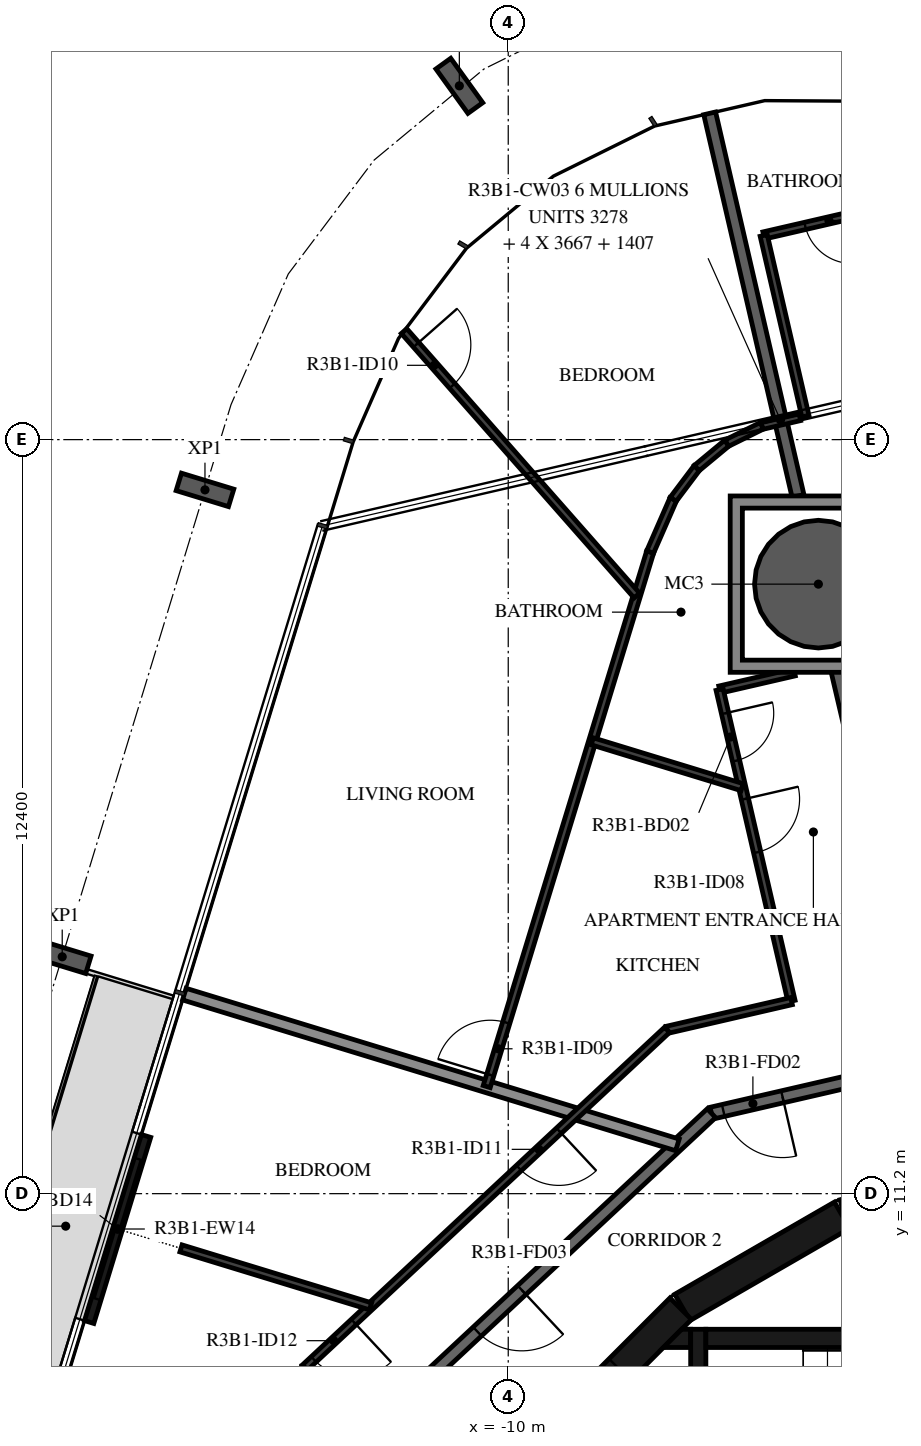
"""IFC4 building model, lengths in metres.
Left out: names, types, materials, properties, quantities, classifications, styles, units other than length and angle.
Written with IfcOpenShell. Run it as: python <this file> out.ifc"""

import sys

from ifc_helpers import new_model, si_unit, direction, frame, frame_2d, origin, origin_2d, place, context, subcontext, project, spatial, polyline, rectangle, hollow_circle, i_section, outline, extrude, element, fill, save


model = new_model("IFC4")
c1 = context("Model", 3, precision=1e-05, world=origin(), true_north=direction((0.0, 1.0)))
c2 = subcontext(c1, "Body", "Model", "MODEL_VIEW")
j1 = project(units=[si_unit("LENGTHUNIT", "METRE"), si_unit("PLANEANGLEUNIT", "RADIAN")], contexts=[c1])
p1 = place(None, origin())
s1 = spatial("IfcSite", under=j1, at=p1, CompositionType="ELEMENT")
p2 = place(p1, origin())
s2 = spatial("IfcBuilding", under=s1, at=p2, CompositionType="ELEMENT")
p3 = place(p2, frame((0.0, 0.0, 123.9)))
s3 = spatial("IfcBuildingStorey", under=s2, at=p3, CompositionType="ELEMENT", Elevation=123.9)
p4 = place(p3, frame((-4.9, 21.223, -0.38), z_axis=(0.0, 0.0, 1.0), x_axis=(1.0, 0.0, 0.0)))
e1 = element("IfcColumn", 1, at=p4, inside=s3, PredefinedType="COLUMN", context=c2, shape_type="SweptSolid", body=[
    extrude(hollow_circle(Radius=1.05, WallThickness=0.05, at=origin_2d()), origin(), (0.0, 0.0, 1.0), 3.5),
])
for number, where, z_axis, x_axis in (
    (2, (-10.804, 29.418, -0.38), (0.0, 0.0, 1.0), (0.811, 0.585, 0.0)),
    (3, (-14.987, 22.773, -0.38), (0.0, 0.0, 1.0), (0.292, 0.956, 0.0)),
    (4, (-17.335, 15.095, -0.38), (0.0, 0.0, 1.0), (0.292, 0.956, 0.0)),
):
    element("IfcColumn", number, at=place(p3, frame(where, z_axis=z_axis, x_axis=x_axis)), inside=s3, PredefinedType="COLUMN", context=c2, shape_type="SweptSolid", body=[
        extrude(i_section(OverallWidth=0.3, OverallDepth=0.9, WebThickness=0.019, FlangeThickness=0.035, FilletRadius=0.03, at=origin_2d()), origin(), (0.0, 0.0, 1.0), 3.5),
    ])
p5 = place(p3, frame((-15.956, 12.149, 0.0), z_axis=(0.0, 0.0, 1.0), x_axis=(-0.29243949851, -0.956284026695, 0.0)))
e5 = element("IfcWall", 5, at=p5, inside=s3, PredefinedType="STANDARD", context=c2, shape_type="SweptSolid", body=[
    extrude(rectangle(XDim=3.2, YDim=0.16, at=frame_2d((1.6, 0.0))), origin(), (0.0, 0.0, 1.0), 3.12),
])
p6 = place(p5, frame((0.4, 0.0, 0.0)))
e6 = element("IfcOpeningElement", 6, at=p6, cuts=e5, PredefinedType="OPENING", context=c2, shape_type="SweptSolid", body=[
    extrude(rectangle(XDim=2.4, YDim=2.4, at=frame_2d((1.2, 1.2))), frame((0.0, 0.09, 0.0), z_axis=(0.0, -1.0, 0.0), x_axis=(1.0, 0.0, 0.0)), (0.0, 0.0, 1.0), 0.18),
])
for number, where, z_axis, x_axis in (
    (7, (-1.55, 11.643, 0.0), (0.0, 0.0, 1.0), (-0.966, -0.259, 0.0)),
    (8, (-4.51, 10.845, 0.0), (0.0, 0.0, 1.0), (-0.866, -0.5, 0.0)),
):
    element("IfcWall", number, at=place(p3, frame(where, z_axis=z_axis, x_axis=x_axis)), inside=s3, PredefinedType="SHEAR", context=c2, shape_type="SweptSolid", body=[
        extrude(rectangle(XDim=3.033, YDim=0.5, at=frame_2d((1.516, 0.0))), origin(), (0.0, 0.0, 1.0), 3.12),
    ])
p7 = place(p3, frame((-7.164, 9.308, 0.0), z_axis=(0.0, 0.0, 1.0), x_axis=(-0.707106781187, -0.707106781187, 0.0)))
e9 = element("IfcWall", 9, at=p7, inside=s3, PredefinedType="SHEAR", context=c2, shape_type="SweptSolid", body=[
    extrude(rectangle(XDim=3.032, YDim=0.5, at=frame_2d((1.516, 0.0))), origin(), (0.0, 0.0, 1.0), 3.12),
])
p8 = place(p7, frame((1.416, 0.0, 0.0)))
e10 = element("IfcOpeningElement", 10, at=p8, cuts=e9, PredefinedType="OPENING", context=c2, shape_type="SweptSolid", body=[
    extrude(rectangle(XDim=1.2, YDim=2.1, at=frame_2d((0.6, 1.05))), frame((0.0, 0.26, 0.0), z_axis=(0.0, -1.0, 0.0), x_axis=(1.0, 0.0, 0.0)), (0.0, 0.0, 1.0), 0.52),
])
p9 = place(p3, frame((-6.75, 8.82, 0.0), z_axis=(0.0, 0.0, 1.0), x_axis=(1.0, 0.0, 0.0)))
e11 = element("IfcWall", 11, at=p9, inside=s3, PredefinedType="SHEAR", context=c2, shape_type="SweptSolid", body=[
    extrude(rectangle(XDim=6.75, YDim=0.3, at=frame_2d((3.375, 0.0))), origin(), (0.0, 0.0, 1.0), 3.12),
])
p10 = place(p3, frame((-6.875, 8.97, 0.0), z_axis=(0.0, 0.0, 1.0), x_axis=(0.0, -1.0, 0.0)))
e12 = element("IfcWall", 12, at=p10, inside=s3, PredefinedType="SHEAR", context=c2, shape_type="SweptSolid", body=[
    extrude(rectangle(XDim=3.92, YDim=0.25, at=frame_2d((1.96, 0.0))), origin(), (0.0, 0.0, 1.0), 3.12),
])
p11 = place(p10, frame((1.61, 0.0, 0.0)))
e13 = element("IfcOpeningElement", 13, at=p11, cuts=e12, PredefinedType="OPENING", context=c2, shape_type="SweptSolid", body=[
    extrude(rectangle(XDim=1.2, YDim=2.1, at=frame_2d((0.6, 1.05))), frame((0.0, 0.135, 0.0), z_axis=(0.0, -1.0, 0.0), x_axis=(1.0, 0.0, 0.0)), (0.0, 0.0, 1.0), 0.27),
])
p12 = place(p3, origin())
e14 = element("IfcWall", 14, at=p12, inside=s3, PredefinedType="SHEAR", context=c2, shape_type="SweptSolid", body=[
    extrude(outline(polyline([(-7.148, 8.97), (-7.0, 8.97), (-7.0, 8.67), (-7.448, 8.67), (-7.148, 8.97)])), origin(), (0.0, 0.0, 1.0), 3.12),
])
p13 = place(p3, frame((0.495, 14.175, 0.0), z_axis=(0.0, 0.0, 1.0), x_axis=(-0.974376622151, -0.224922649383, 0.0)))
e15 = element("IfcWall", 15, at=p13, inside=s3, PredefinedType="STANDARD", context=c2, shape_type="SweptSolid", body=[
    extrude(rectangle(XDim=7.342, YDim=0.2, at=frame_2d((3.671, 0.0))), origin(), (0.0, 0.0, 1.0), 3.12),
])
p14 = place(p13, frame((6.142, 0.0, 0.0)))
e16 = element("IfcOpeningElement", 16, at=p14, cuts=e15, PredefinedType="OPENING", context=c2, shape_type="SweptSolid", body=[
    extrude(rectangle(XDim=1.0, YDim=2.1, at=frame_2d((0.5, 1.05))), frame((0.0, 0.11, 0.0), z_axis=(0.0, -1.0, 0.0), x_axis=(1.0, 0.0, 0.0)), (0.0, 0.0, 1.0), 0.22),
])
p15 = place(p3, frame((-6.659, 12.523, 0.0), z_axis=(0.0, 0.0, 1.0), x_axis=(-0.731350455479, -0.682001841105, 0.0)))
e17 = element("IfcWall", 17, at=p15, inside=s3, PredefinedType="STANDARD", context=c2, shape_type="SweptSolid", body=[
    extrude(rectangle(XDim=7.342, YDim=0.2, at=frame_2d((3.671, 0.0))), origin(), (0.0, 0.0, 1.0), 3.12),
])
p16 = place(p15, frame((4.264, 0.0, 0.0)))
e18 = element("IfcOpeningElement", 18, at=p16, cuts=e17, PredefinedType="OPENING", context=c2, shape_type="SweptSolid", body=[
    extrude(rectangle(XDim=1.0, YDim=2.1, at=frame_2d((0.5, 1.05))), frame((0.0, 0.11, 0.0), z_axis=(0.0, -1.0, 0.0), x_axis=(1.0, 0.0, 0.0)), (0.0, 0.0, 1.0), 0.22),
])
p17 = place(p3, frame((-4.602, 19.839, 0.0), z_axis=(0.0, 0.0, 1.0), x_axis=(0.227891855607, -0.973686449607, 0.0)))
e19 = element("IfcWall", 19, at=p17, inside=s3, PredefinedType="STANDARD", context=c2, shape_type="SweptSolid", body=[
    extrude(rectangle(XDim=6.666, YDim=0.2, at=frame_2d((3.333, 0.0))), origin(), (0.0, 0.0, 1.0), 3.12),
])
p18 = place(p3, frame((-6.687, 28.966, 0.0), z_axis=(0.0, 0.0, 1.0), x_axis=(0.224945100086, -0.974371439415, 0.0)))
e20 = element("IfcWall", 20, at=p18, inside=s3, PredefinedType="STANDARD", context=c2, shape_type="SweptSolid", body=[
    extrude(rectangle(XDim=6.458, YDim=0.2, at=frame_2d((3.229, 0.0))), origin(), (0.0, 0.0, 1.0), 3.12),
])
p19 = place(p3, frame((-15.327, 14.481, 0.0), z_axis=(0.0, 0.0, 1.0), x_axis=(0.956303504869, -0.292375796837, 0.0)))
e21 = element("IfcWall", 21, at=p19, inside=s3, PredefinedType="STANDARD", context=c2, shape_type="SweptSolid", body=[
    extrude(rectangle(XDim=8.48, YDim=0.2, at=frame_2d((4.24, 0.0))), origin(), (0.0, 0.0, 1.0), 2.73),
])
p20 = place(p3, frame((-4.143, 27.34, 0.0), z_axis=(0.0, 0.0, 1.0), x_axis=(-0.974345183359, -0.22505880046, 0.0)))
e22 = element("IfcWall", 22, at=p20, inside=s3, PredefinedType="PARTITIONING", context=c2, shape_type="SweptSolid", body=[
    extrude(rectangle(XDim=1.7, YDim=0.12, at=frame_2d((0.85, 0.0))), origin(), (0.0, 0.0, 1.0), 3.12),
])
p21 = place(p20, frame((0.2, 0.0, 0.0)))
e23 = element("IfcOpeningElement", 23, at=p21, cuts=e22, PredefinedType="OPENING", context=c2, shape_type="SweptSolid", body=[
    extrude(rectangle(XDim=0.8, YDim=2.1, at=frame_2d((0.4, 1.05))), frame((0.0, 0.07, 0.0), z_axis=(0.0, -1.0, 0.0), x_axis=(1.0, 0.0, 0.0)), (0.0, 0.0, 1.0), 0.14),
])
p22 = place(p3, frame((-5.799, 26.957, 0.0), z_axis=(0.0, 0.0, 1.0), x_axis=(0.224876960008, -0.974387167843, 0.0)))
e24 = element("IfcWall", 24, at=p22, inside=s3, PredefinedType="PARTITIONING", context=c2, shape_type="SweptSolid", body=[
    extrude(rectangle(XDim=3.065, YDim=0.12, at=frame_2d((1.532, 0.0))), origin(), (0.0, 0.0, 1.0), 3.12),
])
p23 = place(p3, frame((-5.205, 23.971, 0.0), z_axis=(0.0, 0.0, 1.0), x_axis=(-0.974410422398, -0.224776174722, 0.0)))
e25 = element("IfcWall", 25, at=p23, inside=s3, PredefinedType="PARTITIONING", context=c2, shape_type="SweptSolid", body=[
    extrude(rectangle(XDim=0.642, YDim=0.12, at=frame_2d((0.321, 0.0))), origin(), (0.0, 0.0, 1.0), 3.12),
])
p24 = place(p3, frame((-5.293, 19.773, 0.0), z_axis=(0.0, 0.0, 1.0), x_axis=(-0.974391195695, -0.224859506699, 0.0)))
e26 = element("IfcWall", 26, at=p24, inside=s3, PredefinedType="PARTITIONING", context=c2, shape_type="SweptSolid", body=[
    extrude(rectangle(XDim=1.264, YDim=0.12, at=frame_2d((0.632, 0.0))), origin(), (0.0, 0.0, 1.0), 3.12),
])
p25 = place(p3, frame((-6.524, 19.489, 0.0), z_axis=(0.0, 0.0, 1.0), x_axis=(0.22494768659, -0.974370842286, 0.0)))
e27 = element("IfcWall", 27, at=p25, inside=s3, PredefinedType="PARTITIONING", context=c2, shape_type="SweptSolid", body=[
    extrude(rectangle(XDim=5.257, YDim=0.12, at=frame_2d((2.629, 0.0))), origin(), (0.0, 0.0, 1.0), 3.12),
])
p26 = place(p25, frame((0.4, 0.0, 0.0)))
e28 = element("IfcOpeningElement", 28, at=p26, cuts=e27, PredefinedType="OPENING", context=c2, shape_type="SweptSolid", body=[
    extrude(rectangle(XDim=0.8, YDim=2.1, at=frame_2d((0.4, 1.05))), frame((0.0, 0.07, 0.0), z_axis=(0.0, -1.0, 0.0), x_axis=(1.0, 0.0, 0.0)), (0.0, 0.0, 1.0), 0.14),
])
p27 = place(p25, frame((1.846, 0.0, 0.0)))
e29 = element("IfcOpeningElement", 29, at=p27, cuts=e27, PredefinedType="OPENING", context=c2, shape_type="SweptSolid", body=[
    extrude(rectangle(XDim=0.9, YDim=2.1, at=frame_2d((0.45, 1.05))), frame((0.0, 0.07, 0.0), z_axis=(0.0, -1.0, 0.0), x_axis=(1.0, 0.0, 0.0)), (0.0, 0.0, 1.0), 0.14),
])
p28 = place(p3, frame((-5.342, 14.367, 0.0), z_axis=(0.0, 0.0, 1.0), x_axis=(-0.974367677287, -0.224961395484, 0.0)))
e30 = element("IfcWall", 30, at=p28, inside=s3, PredefinedType="PARTITIONING", context=c2, shape_type="SweptSolid", body=[
    extrude(rectangle(XDim=2.1, YDim=0.12, at=frame_2d((1.05, 0.0))), origin(), (0.0, 0.0, 1.0), 3.12),
])
p29 = place(p3, frame((-7.388, 13.894, 0.0), z_axis=(0.0, 0.0, 1.0), x_axis=(-0.731357186721, -0.681994622729, 0.0)))
e31 = element("IfcWall", 31, at=p29, inside=s3, PredefinedType="PARTITIONING", context=c2, shape_type="SweptSolid", body=[
    extrude(rectangle(XDim=8.146, YDim=0.12, at=frame_2d((4.073, 0.0))), origin(), (0.0, 0.0, 1.0), 3.12),
])
p30 = place(p29, frame((2.432, 0.0, 0.0)))
e32 = element("IfcOpeningElement", 32, at=p30, cuts=e31, PredefinedType="OPENING", context=c2, shape_type="SweptSolid", body=[
    extrude(rectangle(XDim=0.9, YDim=2.1, at=frame_2d((0.45, 1.05))), frame((0.0, 0.07, 0.0), z_axis=(0.0, -1.0, 0.0), x_axis=(1.0, 0.0, 0.0)), (0.0, 0.0, 1.0), 0.14),
])
p31 = place(p29, frame((7.046, 0.0, 0.0)))
e33 = element("IfcOpeningElement", 33, at=p31, cuts=e31, PredefinedType="OPENING", context=c2, shape_type="SweptSolid", body=[
    extrude(rectangle(XDim=0.9, YDim=2.1, at=frame_2d((0.45, 1.05))), frame((0.0, 0.07, 0.0), z_axis=(0.0, -1.0, 0.0), x_axis=(1.0, 0.0, 0.0)), (0.0, 0.0, 1.0), 0.14),
])
p32 = place(p3, frame((-10.354, 12.961, 0.0), z_axis=(0.0, 0.0, 1.0), x_axis=(0.292379778045, 0.956302287663, 0.0)))
e34 = element("IfcWall", 34, at=p32, inside=s3, PredefinedType="PARTITIONING", context=c2, shape_type="SweptSolid", body=[
    extrude(rectangle(XDim=9.194, YDim=0.12, at=frame_2d((4.597, 0.0))), origin(), (0.0, 0.0, 1.0), 3.12),
])
p33 = place(p32, frame((0.2, 0.0, 0.0)))
e35 = element("IfcOpeningElement", 35, at=p33, cuts=e34, PredefinedType="OPENING", context=c2, shape_type="SweptSolid", body=[
    extrude(rectangle(XDim=0.9, YDim=2.1, at=frame_2d((0.45, 1.05))), frame((0.0, 0.07, 0.0), z_axis=(0.0, -1.0, 0.0), x_axis=(1.0, 0.0, 0.0)), (0.0, 0.0, 1.0), 0.14),
])
p34 = place(p3, frame((-7.666, 21.753, 0.0), z_axis=(0.0, 0.0, 1.0), x_axis=(0.401562829944, 0.915831476642, 0.0)))
e36 = element("IfcWall", 36, at=p34, inside=s3, PredefinedType="PARTITIONING", context=c2, shape_type="SweptSolid", body=[
    extrude(rectangle(XDim=0.947, YDim=0.12, at=frame_2d((0.473, 0.0))), origin(), (0.0, 0.0, 1.0), 3.12),
])
p35 = place(p3, frame((-7.286, 22.62, 0.0), z_axis=(0.0, 0.0, 1.0), x_axis=(0.601702575527, 0.798720233, 0.0)))
e37 = element("IfcWall", 37, at=p35, inside=s3, PredefinedType="PARTITIONING", context=c2, shape_type="SweptSolid", body=[
    extrude(rectangle(XDim=0.642, YDim=0.12, at=frame_2d((0.321, 0.0))), origin(), (0.0, 0.0, 1.0), 3.12),
])
p36 = place(p3, frame((-6.9, 23.132, 0.0), z_axis=(0.0, 0.0, 1.0), x_axis=(0.769653132962, 0.638462258025, 0.0)))
e38 = element("IfcWall", 38, at=p36, inside=s3, PredefinedType="PARTITIONING", context=c2, shape_type="SweptSolid", body=[
    extrude(rectangle(XDim=0.642, YDim=0.12, at=frame_2d((0.321, 0.0))), origin(), (0.0, 0.0, 1.0), 3.12),
])
p37 = place(p3, frame((-6.406, 23.542, 0.0), z_axis=(0.0, 0.0, 1.0), x_axis=(0.896245703043, 0.44355793283, 0.0)))
e39 = element("IfcWall", 39, at=p37, inside=s3, PredefinedType="PARTITIONING", context=c2, shape_type="SweptSolid", body=[
    extrude(rectangle(XDim=0.642, YDim=0.12, at=frame_2d((0.321, 0.0))), origin(), (0.0, 0.0, 1.0), 3.12),
])
p38 = place(p3, frame((-11.713, 25.385, 0.0), z_axis=(0.0, 0.0, 1.0), x_axis=(0.660694383024, -0.750655002142, 0.0)))
e40 = element("IfcWall", 40, at=p38, inside=s3, PredefinedType="PARTITIONING", context=c2, shape_type="SweptSolid", body=[
    extrude(rectangle(XDim=5.794, YDim=0.12, at=frame_2d((2.897, 0.0))), origin(), (0.0, 0.0, 1.0), 3.12),
])
p39 = place(p38, frame((0.3, 0.0, 0.0)))
e41 = element("IfcOpeningElement", 41, at=p39, cuts=e40, PredefinedType="OPENING", context=c2, shape_type="SweptSolid", body=[
    extrude(rectangle(XDim=0.9, YDim=2.1, at=frame_2d((0.45, 1.05))), frame((0.0, 0.07, 0.0), z_axis=(0.0, -1.0, 0.0), x_axis=(1.0, 0.0, 0.0)), (0.0, 0.0, 1.0), 0.14),
])
p40 = place(p3, frame((-8.618, 18.639, 0.0), z_axis=(0.0, 0.0, 1.0), x_axis=(0.956305961168, -0.292367762647, 0.0)))
e42 = element("IfcWall", 42, at=p40, inside=s3, PredefinedType="PARTITIONING", context=c2, shape_type="SweptSolid", body=[
    extrude(rectangle(XDim=2.577, YDim=0.12, at=frame_2d((1.289, 0.0))), origin(), (0.0, 0.0, 1.0), 3.12),
])
p41 = place(p3, frame((-13.345, 8.339, 0.0), z_axis=(0.0, 0.0, 1.0), x_axis=(-0.292341490839, -0.956313992752, 0.0)))
e43 = element("IfcWall", 43, at=p41, inside=s3, PredefinedType="PARTITIONING", context=c2, shape_type="SweptSolid", body=[
    extrude(rectangle(XDim=4.742, YDim=0.12, at=frame_2d((2.371, 0.0))), origin(), (0.0, 0.0, 1.0), 3.12),
])
p42 = place(p41, frame((2.935, 0.0, 0.0)))
e44 = element("IfcOpeningElement", 44, at=p42, cuts=e43, PredefinedType="OPENING", context=c2, shape_type="SweptSolid", body=[
    extrude(rectangle(XDim=0.8, YDim=2.1, at=frame_2d((0.4, 1.05))), frame((0.0, 0.07, 0.0), z_axis=(0.0, -1.0, 0.0), x_axis=(1.0, 0.0, 0.0)), (0.0, 0.0, 1.0), 0.14),
])
p43 = place(p3, frame((-15.382, 10.3, 0.0), z_axis=(0.0, 0.0, 1.0), x_axis=(0.956302139964, -0.292380261134, 0.0)))
e45 = element("IfcWall", 45, at=p43, inside=s3, PredefinedType="PARTITIONING", context=c2, shape_type="SweptSolid", body=[
    extrude(rectangle(XDim=3.26, YDim=0.12, at=frame_2d((1.63, 0.0))), origin(), (0.0, 0.0, 1.0), 3.12),
])
p44 = place(p3, origin())
e46 = element("IfcWall", 46, at=p44, inside=s3, PredefinedType="STANDARD", context=c2, shape_type="SweptSolid", body=[
    extrude(outline(polyline([(-3.45, 22.674), (-3.45, 19.773), (-6.35, 19.773), (-6.35, 22.674), (-3.45, 22.674)]), holes=[polyline([(-6.15, 19.973), (-3.65, 19.973), (-3.65, 22.473), (-6.15, 22.473), (-6.15, 19.973)])]), origin(), (0.0, 0.0, 1.0), 3.12),
])
p45 = place(p6, origin())
e47 = element("IfcDoor", 47, at=p45, inside=s3, OperationType="DOUBLE_DOOR_SLIDING", PredefinedType="DOOR", context=c2, shape_type="SweptSolid", body=[
    extrude(rectangle(XDim=2.4, YDim=2.4, at=frame_2d((1.2, 1.2))), frame((0.0, 0.025, 0.0), z_axis=(0.0, -1.0, 0.0), x_axis=(1.0, 0.0, 0.0)), (0.0, 0.0, 1.0), 0.05),
])
fill(e6, e47)
p46 = place(p21, origin())
e48 = element("IfcDoor", 48, at=p46, inside=s3, OperationType="SINGLE_SWING_RIGHT", PredefinedType="DOOR", context=c2, shape_type="SweptSolid", body=[
    extrude(rectangle(XDim=0.8, YDim=2.1, at=frame_2d((0.4, 1.05))), frame((0.0, 0.025, 0.0), z_axis=(0.0, -1.0, 0.0), x_axis=(1.0, 0.0, 0.0)), (0.0, 0.0, 1.0), 0.05),
])
fill(e23, e48)
p47 = place(p14, origin())
e49 = element("IfcDoor", 49, at=p47, inside=s3, OperationType="SINGLE_SWING_LEFT", PredefinedType="DOOR", context=c2, shape_type="SweptSolid", body=[
    extrude(rectangle(XDim=1.0, YDim=2.1, at=frame_2d((0.5, 1.05))), frame((0.0, 0.025, 0.0), z_axis=(0.0, -1.0, 0.0), x_axis=(1.0, 0.0, 0.0)), (0.0, 0.0, 1.0), 0.05),
])
fill(e16, e49)
p48 = place(p26, origin())
e50 = element("IfcDoor", 50, at=p48, inside=s3, OperationType="SINGLE_SWING_LEFT", PredefinedType="DOOR", context=c2, shape_type="SweptSolid", body=[
    extrude(rectangle(XDim=0.8, YDim=2.1, at=frame_2d((0.4, 1.05))), frame((0.0, 0.025, 0.0), z_axis=(0.0, -1.0, 0.0), x_axis=(1.0, 0.0, 0.0)), (0.0, 0.0, 1.0), 0.05),
])
fill(e28, e50)
p49 = place(p27, origin())
e51 = element("IfcDoor", 51, at=p49, inside=s3, OperationType="SINGLE_SWING_LEFT", PredefinedType="DOOR", context=c2, shape_type="SweptSolid", body=[
    extrude(rectangle(XDim=0.9, YDim=2.1, at=frame_2d((0.45, 1.05))), frame((0.0, 0.025, 0.0), z_axis=(0.0, -1.0, 0.0), x_axis=(1.0, 0.0, 0.0)), (0.0, 0.0, 1.0), 0.05),
])
fill(e29, e51)
p50 = place(p33, origin())
e52 = element("IfcDoor", 52, at=p50, inside=s3, OperationType="SINGLE_SWING_LEFT", PredefinedType="DOOR", context=c2, shape_type="SweptSolid", body=[
    extrude(rectangle(XDim=0.9, YDim=2.1, at=frame_2d((0.45, 1.05))), frame((0.0, 0.025, 0.0), z_axis=(0.0, -1.0, 0.0), x_axis=(1.0, 0.0, 0.0)), (0.0, 0.0, 1.0), 0.05),
])
fill(e35, e52)
p51 = place(p39, origin())
e53 = element("IfcDoor", 53, at=p51, inside=s3, OperationType="SINGLE_SWING_LEFT", PredefinedType="DOOR", context=c2, shape_type="SweptSolid", body=[
    extrude(rectangle(XDim=0.9, YDim=2.1, at=frame_2d((0.45, 1.05))), frame((0.0, 0.025, 0.0), z_axis=(0.0, -1.0, 0.0), x_axis=(1.0, 0.0, 0.0)), (0.0, 0.0, 1.0), 0.05),
])
fill(e41, e53)
p52 = place(p16, origin())
e54 = element("IfcDoor", 54, at=p52, inside=s3, OperationType="SINGLE_SWING_LEFT", PredefinedType="DOOR", context=c2, shape_type="SweptSolid", body=[
    extrude(rectangle(XDim=1.0, YDim=2.1, at=frame_2d((0.5, 1.05))), frame((0.0, 0.025, 0.0), z_axis=(0.0, -1.0, 0.0), x_axis=(1.0, 0.0, 0.0)), (0.0, 0.0, 1.0), 0.05),
])
fill(e18, e54)
p53 = place(p30, origin())
e55 = element("IfcDoor", 55, at=p53, inside=s3, OperationType="SINGLE_SWING_LEFT", PredefinedType="DOOR", context=c2, shape_type="SweptSolid", body=[
    extrude(rectangle(XDim=0.9, YDim=2.1, at=frame_2d((0.45, 1.05))), frame((0.0, 0.025, 0.0), z_axis=(0.0, -1.0, 0.0), x_axis=(1.0, 0.0, 0.0)), (0.0, 0.0, 1.0), 0.05),
])
fill(e32, e55)
p54 = place(p31, origin())
e56 = element("IfcDoor", 56, at=p54, inside=s3, OperationType="SINGLE_SWING_LEFT", PredefinedType="DOOR", context=c2, shape_type="SweptSolid", body=[
    extrude(rectangle(XDim=0.9, YDim=2.1, at=frame_2d((0.45, 1.05))), frame((0.0, 0.025, 0.0), z_axis=(0.0, -1.0, 0.0), x_axis=(1.0, 0.0, 0.0)), (0.0, 0.0, 1.0), 0.05),
])
fill(e33, e56)
save(model, sys.argv[1])
